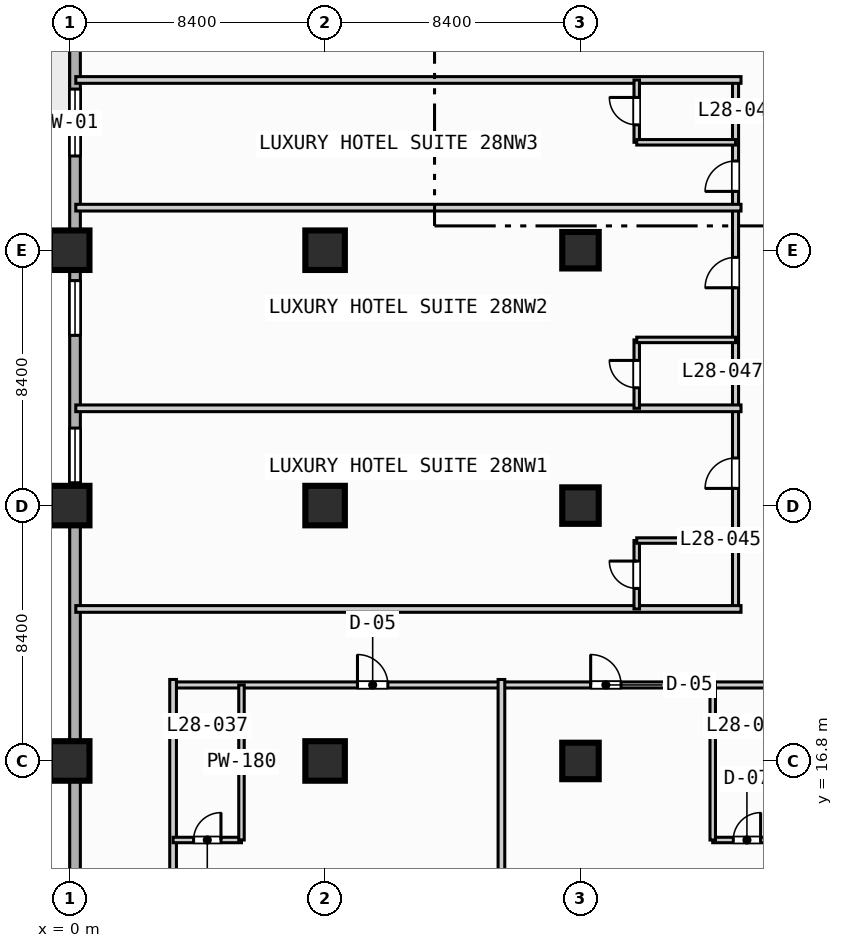
"""IFC4 building model, lengths in metres.
Left out: names, types, materials, properties, quantities, classifications, styles, units other than length and angle.
Written with IfcOpenShell. Run it as: python <this file> out.ifc"""

import sys

from ifc_helpers import new_model, si_unit, direction, frame, frame_2d, origin, origin_2d, place, context, subcontext, project, spatial, rectangle, extrude, element, fill, save


model = new_model("IFC4")
c1 = context("Model", 3, precision=1e-05, world=origin(), true_north=direction((0.0, 1.0)))
c2 = subcontext(c1, "Body", "Model", "MODEL_VIEW")
j1 = project(units=[si_unit("LENGTHUNIT", "METRE"), si_unit("PLANEANGLEUNIT", "RADIAN")], contexts=[c1])
p1 = place(None, origin())
s1 = spatial("IfcSite", under=j1, at=p1, CompositionType="ELEMENT")
p2 = place(p1, origin())
s2 = spatial("IfcBuilding", under=s1, at=p2, CompositionType="ELEMENT")
p3 = place(p2, frame((0.0, 0.0, 119.0)))
s3 = spatial("IfcBuildingStorey", under=s2, at=p3, CompositionType="ELEMENT", Elevation=119.0)
for number, where, z_axis, x_axis in (
    (1, (0.0, 16.8, 0.0), (0.0, 0.0, 1.0), (1.0, 0.0, 0.0)),
    (2, (0.0, 25.2, 0.0), (0.0, 0.0, 1.0), (1.0, 0.0, 0.0)),
    (3, (0.0, 33.6, 0.0), (0.0, 0.0, 1.0), (1.0, 0.0, 0.0)),
    (4, (8.4, 16.8, 0.0), (0.0, 0.0, 1.0), (1.0, 0.0, 0.0)),
    (5, (8.4, 25.2, 0.0), (0.0, 0.0, 1.0), (1.0, 0.0, 0.0)),
    (6, (8.4, 33.6, 0.0), (0.0, 0.0, 1.0), (1.0, 0.0, 0.0)),
):
    element("IfcColumn", number, at=place(p3, frame(where, z_axis=z_axis, x_axis=x_axis)), inside=s3, PredefinedType="COLUMN", context=c2, shape_type="SweptSolid", body=[
        extrude(rectangle(XDim=1.3, YDim=1.3, at=origin_2d()), origin(), (0.0, 0.0, 1.0), 3.8),
    ])
for number, where, z_axis, x_axis in (
    (7, (16.8, 16.8, 0.0), (0.0, 0.0, 1.0), (1.0, 0.0, 0.0)),
    (8, (16.8, 25.2, 0.0), (0.0, 0.0, 1.0), (1.0, 0.0, 0.0)),
    (9, (16.8, 33.6, 0.0), (0.0, 0.0, 1.0), (1.0, 0.0, 0.0)),
):
    element("IfcColumn", number, at=place(p3, frame(where, z_axis=z_axis, x_axis=x_axis)), inside=s3, PredefinedType="COLUMN", context=c2, shape_type="SweptSolid", body=[
        extrude(rectangle(XDim=1.2, YDim=1.2, at=origin_2d()), origin(), (0.0, 0.0, 1.0), 3.8),
    ])
p4 = place(p3, frame((0.175, 3.175, 0.0), z_axis=(0.0, 0.0, 1.0), x_axis=(0.0, 1.0, 0.0)))
e10 = element("IfcWall", 10, at=p4, inside=s3, PredefinedType="STANDARD", context=c2, shape_type="SweptSolid", body=[
    extrude(rectangle(XDim=86.05, YDim=0.35, at=frame_2d((43.025, 0.0))), origin(), (0.0, 0.0, 1.0), 3.55),
])
p5 = place(p4, frame((42.325, 0.0, 0.0)))
e11 = element("IfcOpeningElement", 11, at=p5, cuts=e10, PredefinedType="OPENING", context=c2, shape_type="SweptSolid", body=[
    extrude(rectangle(XDim=1.4, YDim=2.2, at=frame_2d((0.7, 1.1))), frame((0.0, 0.185, 0.0), z_axis=(0.0, -1.0, 0.0), x_axis=(1.0, 0.0, 0.0)), (0.0, 0.0, 1.0), 0.37),
])
p6 = place(p4, frame((33.525, 0.0, 0.85)))
e12 = element("IfcOpeningElement", 12, at=p6, cuts=e10, PredefinedType="OPENING", context=c2, shape_type="SweptSolid", body=[
    extrude(rectangle(XDim=2.2, YDim=1.8, at=frame_2d((1.1, 0.9))), frame((0.0, 0.185, 0.0), z_axis=(0.0, -1.0, 0.0), x_axis=(1.0, 0.0, 0.0)), (0.0, 0.0, 1.0), 0.37),
])
p7 = place(p4, frame((22.775, 0.0, 0.85)))
e13 = element("IfcOpeningElement", 13, at=p7, cuts=e10, PredefinedType="OPENING", context=c2, shape_type="SweptSolid", body=[
    extrude(rectangle(XDim=1.8, YDim=1.8, at=frame_2d((0.9, 0.9))), frame((0.0, 0.185, 0.0), z_axis=(0.0, -1.0, 0.0), x_axis=(1.0, 0.0, 0.0)), (0.0, 0.0, 1.0), 0.37),
])
p8 = place(p4, frame((27.625, 0.0, 0.85)))
e14 = element("IfcOpeningElement", 14, at=p8, cuts=e10, PredefinedType="OPENING", context=c2, shape_type="SweptSolid", body=[
    extrude(rectangle(XDim=1.8, YDim=1.8, at=frame_2d((0.9, 0.9))), frame((0.0, 0.185, 0.0), z_axis=(0.0, -1.0, 0.0), x_axis=(1.0, 0.0, 0.0)), (0.0, 0.0, 1.0), 0.37),
])
p9 = place(p3, frame((3.4, 19.3, 0.0), z_axis=(0.0, 0.0, 1.0), x_axis=(1.0, 0.0, 0.0)))
e15 = element("IfcWall", 15, at=p9, inside=s3, PredefinedType="PARTITIONING", context=c2, shape_type="SweptSolid", body=[
    extrude(rectangle(XDim=35.8, YDim=0.2, at=frame_2d((17.9, 0.0))), origin(), (0.0, 0.0, 1.0), 3.55),
])
p10 = place(p9, frame((6.065, 0.0, 0.0)))
e16 = element("IfcOpeningElement", 16, at=p10, cuts=e15, PredefinedType="OPENING", context=c2, shape_type="SweptSolid", body=[
    extrude(rectangle(XDim=1.0, YDim=2.15, at=frame_2d((0.5, 1.075))), frame((0.0, 0.11, 0.0), z_axis=(0.0, -1.0, 0.0), x_axis=(1.0, 0.0, 0.0)), (0.0, 0.0, 1.0), 0.22),
])
p11 = place(p9, frame((13.735, 0.0, 0.0)))
e17 = element("IfcOpeningElement", 17, at=p11, cuts=e15, PredefinedType="OPENING", context=c2, shape_type="SweptSolid", body=[
    extrude(rectangle(XDim=1.0, YDim=2.15, at=frame_2d((0.5, 1.075))), frame((0.0, 0.11, 0.0), z_axis=(0.0, -1.0, 0.0), x_axis=(1.0, 0.0, 0.0)), (0.0, 0.0, 1.0), 0.22),
])
p12 = place(p9, frame((22.96, 0.0, 0.0)))
e18 = element("IfcOpeningElement", 18, at=p12, cuts=e15, PredefinedType="OPENING", context=c2, shape_type="SweptSolid", body=[
    extrude(rectangle(XDim=1.0, YDim=2.15, at=frame_2d((0.5, 1.075))), frame((0.0, 0.11, 0.0), z_axis=(0.0, -1.0, 0.0), x_axis=(1.0, 0.0, 0.0)), (0.0, 0.0, 1.0), 0.22),
])
p13 = place(p9, frame((30.86, 0.0, 0.0)))
e19 = element("IfcOpeningElement", 19, at=p13, cuts=e15, PredefinedType="OPENING", context=c2, shape_type="SweptSolid", body=[
    extrude(rectangle(XDim=1.0, YDim=2.15, at=frame_2d((0.5, 1.075))), frame((0.0, 0.11, 0.0), z_axis=(0.0, -1.0, 0.0), x_axis=(1.0, 0.0, 0.0)), (0.0, 0.0, 1.0), 0.22),
])
p14 = place(p3, frame((3.4, 0.2, 0.0), z_axis=(0.0, 0.0, 1.0), x_axis=(0.0, 1.0, 0.0)))
e20 = element("IfcWall", 20, at=p14, inside=s3, PredefinedType="PARTITIONING", context=c2, shape_type="SweptSolid", body=[
    extrude(rectangle(XDim=19.28, YDim=0.22, at=frame_2d((9.64, 0.0))), origin(), (0.0, 0.0, 1.0), 3.55),
])
p15 = place(p3, frame((3.4, 14.2, 0.0), z_axis=(0.0, 0.0, 1.0), x_axis=(1.0, 0.0, 0.0)))
e21 = element("IfcWall", 21, at=p15, inside=s3, PredefinedType="PLUMBINGWALL", context=c2, shape_type="SweptSolid", body=[
    extrude(rectangle(XDim=2.25, YDim=0.18, at=frame_2d((1.125, 0.0))), origin(), (0.0, 0.0, 1.0), 3.55),
])
p16 = place(p15, frame((0.675, 0.0, 0.0)))
e22 = element("IfcOpeningElement", 22, at=p16, cuts=e21, PredefinedType="OPENING", context=c2, shape_type="SweptSolid", body=[
    extrude(rectangle(XDim=0.9, YDim=2.1, at=frame_2d((0.45, 1.05))), frame((0.0, 0.1, 0.0), z_axis=(0.0, -1.0, 0.0), x_axis=(1.0, 0.0, 0.0)), (0.0, 0.0, 1.0), 0.2),
])
p17 = place(p3, frame((5.65, 14.2, 0.0), z_axis=(0.0, 0.0, 1.0), x_axis=(0.0, 1.0, 0.0)))
e23 = element("IfcWall", 23, at=p17, inside=s3, PredefinedType="PLUMBINGWALL", context=c2, shape_type="SweptSolid", body=[
    extrude(rectangle(XDim=5.1, YDim=0.18, at=frame_2d((2.55, 0.0))), origin(), (0.0, 0.0, 1.0), 3.55),
])
p18 = place(p3, frame((14.2, 0.2, 0.0), z_axis=(0.0, 0.0, 1.0), x_axis=(0.0, 1.0, 0.0)))
e24 = element("IfcWall", 24, at=p18, inside=s3, PredefinedType="PARTITIONING", context=c2, shape_type="SweptSolid", body=[
    extrude(rectangle(XDim=19.28, YDim=0.22, at=frame_2d((9.64, 0.0))), origin(), (0.0, 0.0, 1.0), 3.55),
])
p19 = place(p3, frame((21.15, 14.2, 0.0), z_axis=(0.0, 0.0, 1.0), x_axis=(1.0, 0.0, 0.0)))
e25 = element("IfcWall", 25, at=p19, inside=s3, PredefinedType="PLUMBINGWALL", context=c2, shape_type="SweptSolid", body=[
    extrude(rectangle(XDim=2.25, YDim=0.18, at=frame_2d((1.125, 0.0))), origin(), (0.0, 0.0, 1.0), 3.55),
])
p20 = place(p19, frame((0.675, 0.0, 0.0)))
e26 = element("IfcOpeningElement", 26, at=p20, cuts=e25, PredefinedType="OPENING", context=c2, shape_type="SweptSolid", body=[
    extrude(rectangle(XDim=0.9, YDim=2.1, at=frame_2d((0.45, 1.05))), frame((0.0, 0.1, 0.0), z_axis=(0.0, -1.0, 0.0), x_axis=(1.0, 0.0, 0.0)), (0.0, 0.0, 1.0), 0.2),
])
p21 = place(p3, frame((21.15, 14.2, 0.0), z_axis=(0.0, 0.0, 1.0), x_axis=(0.0, 1.0, 0.0)))
e27 = element("IfcWall", 27, at=p21, inside=s3, PredefinedType="PLUMBINGWALL", context=c2, shape_type="SweptSolid", body=[
    extrude(rectangle(XDim=5.1, YDim=0.18, at=frame_2d((2.55, 0.0))), origin(), (0.0, 0.0, 1.0), 3.55),
])
p22 = place(p3, frame((21.9, 21.8, 0.0), z_axis=(0.0, 0.0, 1.0), x_axis=(0.0, 1.0, 0.0)))
e28 = element("IfcWall", 28, at=p22, inside=s3, PredefinedType="PARTITIONING", context=c2, shape_type="SweptSolid", body=[
    extrude(rectangle(XDim=17.4, YDim=0.2, at=frame_2d((8.7, 0.0))), origin(), (0.0, 0.0, 1.0), 3.55),
])
p23 = place(p22, frame((3.965, 0.0, 0.0)))
e29 = element("IfcOpeningElement", 29, at=p23, cuts=e28, PredefinedType="OPENING", context=c2, shape_type="SweptSolid", body=[
    extrude(rectangle(XDim=1.0, YDim=2.15, at=frame_2d((0.5, 1.075))), frame((0.0, 0.11, 0.0), z_axis=(0.0, -1.0, 0.0), x_axis=(1.0, 0.0, 0.0)), (0.0, 0.0, 1.0), 0.22),
])
p24 = place(p22, frame((10.565, 0.0, 0.0)))
e30 = element("IfcOpeningElement", 30, at=p24, cuts=e28, PredefinedType="OPENING", context=c2, shape_type="SweptSolid", body=[
    extrude(rectangle(XDim=1.0, YDim=2.15, at=frame_2d((0.5, 1.075))), frame((0.0, 0.11, 0.0), z_axis=(0.0, -1.0, 0.0), x_axis=(1.0, 0.0, 0.0)), (0.0, 0.0, 1.0), 0.22),
])
p25 = place(p22, frame((13.735, 0.0, 0.0)))
e31 = element("IfcOpeningElement", 31, at=p25, cuts=e28, PredefinedType="OPENING", context=c2, shape_type="SweptSolid", body=[
    extrude(rectangle(XDim=1.0, YDim=2.15, at=frame_2d((0.5, 1.075))), frame((0.0, 0.11, 0.0), z_axis=(0.0, -1.0, 0.0), x_axis=(1.0, 0.0, 0.0)), (0.0, 0.0, 1.0), 0.22),
])
p26 = place(p3, frame((0.2, 21.8, 0.0), z_axis=(0.0, 0.0, 1.0), x_axis=(1.0, 0.0, 0.0)))
e32 = element("IfcWall", 32, at=p26, inside=s3, PredefinedType="PARTITIONING", context=c2, shape_type="SweptSolid", body=[
    extrude(rectangle(XDim=21.88, YDim=0.22, at=frame_2d((10.94, 0.0))), origin(), (0.0, 0.0, 1.0), 3.55),
])
p27 = place(p3, frame((18.65, 21.8, 0.0), z_axis=(0.0, 0.0, 1.0), x_axis=(0.0, 1.0, 0.0)))
e33 = element("IfcWall", 33, at=p27, inside=s3, PredefinedType="PLUMBINGWALL", context=c2, shape_type="SweptSolid", body=[
    extrude(rectangle(XDim=2.25, YDim=0.18, at=frame_2d((1.125, 0.0))), origin(), (0.0, 0.0, 1.0), 3.55),
])
p28 = place(p27, frame((0.675, 0.0, 0.0)))
e34 = element("IfcOpeningElement", 34, at=p28, cuts=e33, PredefinedType="OPENING", context=c2, shape_type="SweptSolid", body=[
    extrude(rectangle(XDim=0.9, YDim=2.1, at=frame_2d((0.45, 1.05))), frame((0.0, 0.1, 0.0), z_axis=(0.0, -1.0, 0.0), x_axis=(1.0, 0.0, 0.0)), (0.0, 0.0, 1.0), 0.2),
])
p29 = place(p3, frame((18.65, 24.05, 0.0), z_axis=(0.0, 0.0, 1.0), x_axis=(1.0, 0.0, 0.0)))
e35 = element("IfcWall", 35, at=p29, inside=s3, PredefinedType="PLUMBINGWALL", context=c2, shape_type="SweptSolid", body=[
    extrude(rectangle(XDim=3.25, YDim=0.18, at=frame_2d((1.625, 0.0))), origin(), (0.0, 0.0, 1.0), 3.55),
])
p30 = place(p3, frame((0.2, 28.4, 0.0), z_axis=(0.0, 0.0, 1.0), x_axis=(1.0, 0.0, 0.0)))
e36 = element("IfcWall", 36, at=p30, inside=s3, PredefinedType="PARTITIONING", context=c2, shape_type="SweptSolid", body=[
    extrude(rectangle(XDim=21.88, YDim=0.22, at=frame_2d((10.94, 0.0))), origin(), (0.0, 0.0, 1.0), 3.55),
])
p31 = place(p3, frame((18.65, 28.4, 0.0), z_axis=(0.0, 0.0, 1.0), x_axis=(0.0, 1.0, 0.0)))
e37 = element("IfcWall", 37, at=p31, inside=s3, PredefinedType="PLUMBINGWALL", context=c2, shape_type="SweptSolid", body=[
    extrude(rectangle(XDim=2.25, YDim=0.18, at=frame_2d((1.125, 0.0))), origin(), (0.0, 0.0, 1.0), 3.55),
])
p32 = place(p31, frame((0.675, 0.0, 0.0)))
e38 = element("IfcOpeningElement", 38, at=p32, cuts=e37, PredefinedType="OPENING", context=c2, shape_type="SweptSolid", body=[
    extrude(rectangle(XDim=0.9, YDim=2.1, at=frame_2d((0.45, 1.05))), frame((0.0, 0.1, 0.0), z_axis=(0.0, -1.0, 0.0), x_axis=(1.0, 0.0, 0.0)), (0.0, 0.0, 1.0), 0.2),
])
p33 = place(p3, frame((18.65, 30.65, 0.0), z_axis=(0.0, 0.0, 1.0), x_axis=(1.0, 0.0, 0.0)))
e39 = element("IfcWall", 39, at=p33, inside=s3, PredefinedType="PLUMBINGWALL", context=c2, shape_type="SweptSolid", body=[
    extrude(rectangle(XDim=3.25, YDim=0.18, at=frame_2d((1.625, 0.0))), origin(), (0.0, 0.0, 1.0), 3.55),
])
for number, where, z_axis, x_axis in (
    (40, (0.2, 35.0, 0.0), (0.0, 0.0, 1.0), (1.0, 0.0, 0.0)),
    (41, (0.2, 39.2, 0.0), (0.0, 0.0, 1.0), (1.0, 0.0, 0.0)),
):
    element("IfcWall", number, at=place(p3, frame(where, z_axis=z_axis, x_axis=x_axis)), inside=s3, PredefinedType="PARTITIONING", context=c2, shape_type="SweptSolid", body=[
        extrude(rectangle(XDim=21.88, YDim=0.22, at=frame_2d((10.94, 0.0))), origin(), (0.0, 0.0, 1.0), 3.55),
    ])
p34 = place(p3, frame((18.65, 37.15, 0.0), z_axis=(0.0, 0.0, 1.0), x_axis=(0.0, 1.0, 0.0)))
e42 = element("IfcWall", 42, at=p34, inside=s3, PredefinedType="PLUMBINGWALL", context=c2, shape_type="SweptSolid", body=[
    extrude(rectangle(XDim=2.05, YDim=0.18, at=frame_2d((1.025, 0.0))), origin(), (0.0, 0.0, 1.0), 3.55),
])
p35 = place(p34, frame((0.575, 0.0, 0.0)))
e43 = element("IfcOpeningElement", 43, at=p35, cuts=e42, PredefinedType="OPENING", context=c2, shape_type="SweptSolid", body=[
    extrude(rectangle(XDim=0.9, YDim=2.1, at=frame_2d((0.45, 1.05))), frame((0.0, 0.1, 0.0), z_axis=(0.0, -1.0, 0.0), x_axis=(1.0, 0.0, 0.0)), (0.0, 0.0, 1.0), 0.2),
])
p36 = place(p3, frame((18.65, 37.15, 0.0), z_axis=(0.0, 0.0, 1.0), x_axis=(1.0, 0.0, 0.0)))
e44 = element("IfcWall", 44, at=p36, inside=s3, PredefinedType="PLUMBINGWALL", context=c2, shape_type="SweptSolid", body=[
    extrude(rectangle(XDim=3.25, YDim=0.18, at=frame_2d((1.625, 0.0))), origin(), (0.0, 0.0, 1.0), 3.55),
])
p37 = place(p6, origin())
e45 = element("IfcWindow", 45, at=p37, inside=s3, PartitioningType="SINGLE_PANEL", PredefinedType="WINDOW", context=c2, shape_type="SweptSolid", body=[
    extrude(rectangle(XDim=2.2, YDim=1.8, at=frame_2d((1.1, 0.9))), frame((0.0, 0.03, 0.0), z_axis=(0.0, -1.0, 0.0), x_axis=(1.0, 0.0, 0.0)), (0.0, 0.0, 1.0), 0.06),
])
fill(e12, e45)
p38 = place(p7, origin())
e46 = element("IfcWindow", 46, at=p38, inside=s3, PartitioningType="SINGLE_PANEL", PredefinedType="WINDOW", context=c2, shape_type="SweptSolid", body=[
    extrude(rectangle(XDim=1.8, YDim=1.8, at=frame_2d((0.9, 0.9))), frame((0.0, 0.03, 0.0), z_axis=(0.0, -1.0, 0.0), x_axis=(1.0, 0.0, 0.0)), (0.0, 0.0, 1.0), 0.06),
])
fill(e13, e46)
p39 = place(p8, origin())
e47 = element("IfcWindow", 47, at=p39, inside=s3, PartitioningType="SINGLE_PANEL", PredefinedType="WINDOW", context=c2, shape_type="SweptSolid", body=[
    extrude(rectangle(XDim=1.8, YDim=1.8, at=frame_2d((0.9, 0.9))), frame((0.0, 0.03, 0.0), z_axis=(0.0, -1.0, 0.0), x_axis=(1.0, 0.0, 0.0)), (0.0, 0.0, 1.0), 0.06),
])
fill(e14, e47)
p40 = place(p10, origin())
e48 = element("IfcDoor", 48, at=p40, inside=s3, OperationType="SINGLE_SWING_LEFT", PredefinedType="DOOR", context=c2, shape_type="SweptSolid", body=[
    extrude(rectangle(XDim=1.0, YDim=2.15, at=frame_2d((0.5, 1.075))), frame((0.0, 0.025, 0.0), z_axis=(0.0, -1.0, 0.0), x_axis=(1.0, 0.0, 0.0)), (0.0, 0.0, 1.0), 0.05),
])
fill(e16, e48)
p41 = place(p11, origin())
e49 = element("IfcDoor", 49, at=p41, inside=s3, OperationType="SINGLE_SWING_LEFT", PredefinedType="DOOR", context=c2, shape_type="SweptSolid", body=[
    extrude(rectangle(XDim=1.0, YDim=2.15, at=frame_2d((0.5, 1.075))), frame((0.0, 0.025, 0.0), z_axis=(0.0, -1.0, 0.0), x_axis=(1.0, 0.0, 0.0)), (0.0, 0.0, 1.0), 0.05),
])
fill(e17, e49)
p42 = place(p16, origin())
e50 = element("IfcDoor", 50, at=p42, inside=s3, OperationType="SINGLE_SWING_RIGHT", PredefinedType="DOOR", context=c2, shape_type="SweptSolid", body=[
    extrude(rectangle(XDim=0.9, YDim=2.1, at=frame_2d((0.45, 1.05))), frame((0.0, 0.025, 0.0), z_axis=(0.0, -1.0, 0.0), x_axis=(1.0, 0.0, 0.0)), (0.0, 0.0, 1.0), 0.05),
])
fill(e22, e50)
p43 = place(p20, origin())
e51 = element("IfcDoor", 51, at=p43, inside=s3, OperationType="SINGLE_SWING_RIGHT", PredefinedType="DOOR", context=c2, shape_type="SweptSolid", body=[
    extrude(rectangle(XDim=0.9, YDim=2.1, at=frame_2d((0.45, 1.05))), frame((0.0, 0.025, 0.0), z_axis=(0.0, -1.0, 0.0), x_axis=(1.0, 0.0, 0.0)), (0.0, 0.0, 1.0), 0.05),
])
fill(e26, e51)
p44 = place(p23, origin())
e52 = element("IfcDoor", 52, at=p44, inside=s3, OperationType="SINGLE_SWING_LEFT", PredefinedType="DOOR", context=c2, shape_type="SweptSolid", body=[
    extrude(rectangle(XDim=1.0, YDim=2.15, at=frame_2d((0.5, 1.075))), frame((0.0, 0.025, 0.0), z_axis=(0.0, -1.0, 0.0), x_axis=(1.0, 0.0, 0.0)), (0.0, 0.0, 1.0), 0.05),
])
fill(e29, e52)
p45 = place(p24, origin())
e53 = element("IfcDoor", 53, at=p45, inside=s3, OperationType="SINGLE_SWING_LEFT", PredefinedType="DOOR", context=c2, shape_type="SweptSolid", body=[
    extrude(rectangle(XDim=1.0, YDim=2.15, at=frame_2d((0.5, 1.075))), frame((0.0, 0.025, 0.0), z_axis=(0.0, -1.0, 0.0), x_axis=(1.0, 0.0, 0.0)), (0.0, 0.0, 1.0), 0.05),
])
fill(e30, e53)
p46 = place(p25, origin())
e54 = element("IfcDoor", 54, at=p46, inside=s3, OperationType="SINGLE_SWING_LEFT", PredefinedType="DOOR", context=c2, shape_type="SweptSolid", body=[
    extrude(rectangle(XDim=1.0, YDim=2.15, at=frame_2d((0.5, 1.075))), frame((0.0, 0.025, 0.0), z_axis=(0.0, -1.0, 0.0), x_axis=(1.0, 0.0, 0.0)), (0.0, 0.0, 1.0), 0.05),
])
fill(e31, e54)
p47 = place(p28, origin())
e55 = element("IfcDoor", 55, at=p47, inside=s3, OperationType="SINGLE_SWING_RIGHT", PredefinedType="DOOR", context=c2, shape_type="SweptSolid", body=[
    extrude(rectangle(XDim=0.9, YDim=2.1, at=frame_2d((0.45, 1.05))), frame((0.0, 0.025, 0.0), z_axis=(0.0, -1.0, 0.0), x_axis=(1.0, 0.0, 0.0)), (0.0, 0.0, 1.0), 0.05),
])
fill(e34, e55)
p48 = place(p32, origin())
e56 = element("IfcDoor", 56, at=p48, inside=s3, OperationType="SINGLE_SWING_RIGHT", PredefinedType="DOOR", context=c2, shape_type="SweptSolid", body=[
    extrude(rectangle(XDim=0.9, YDim=2.1, at=frame_2d((0.45, 1.05))), frame((0.0, 0.025, 0.0), z_axis=(0.0, -1.0, 0.0), x_axis=(1.0, 0.0, 0.0)), (0.0, 0.0, 1.0), 0.05),
])
fill(e38, e56)
p49 = place(p35, origin())
e57 = element("IfcDoor", 57, at=p49, inside=s3, OperationType="SINGLE_SWING_RIGHT", PredefinedType="DOOR", context=c2, shape_type="SweptSolid", body=[
    extrude(rectangle(XDim=0.9, YDim=2.1, at=frame_2d((0.45, 1.05))), frame((0.0, 0.025, 0.0), z_axis=(0.0, -1.0, 0.0), x_axis=(1.0, 0.0, 0.0)), (0.0, 0.0, 1.0), 0.05),
])
fill(e43, e57)
save(model, sys.argv[1])
